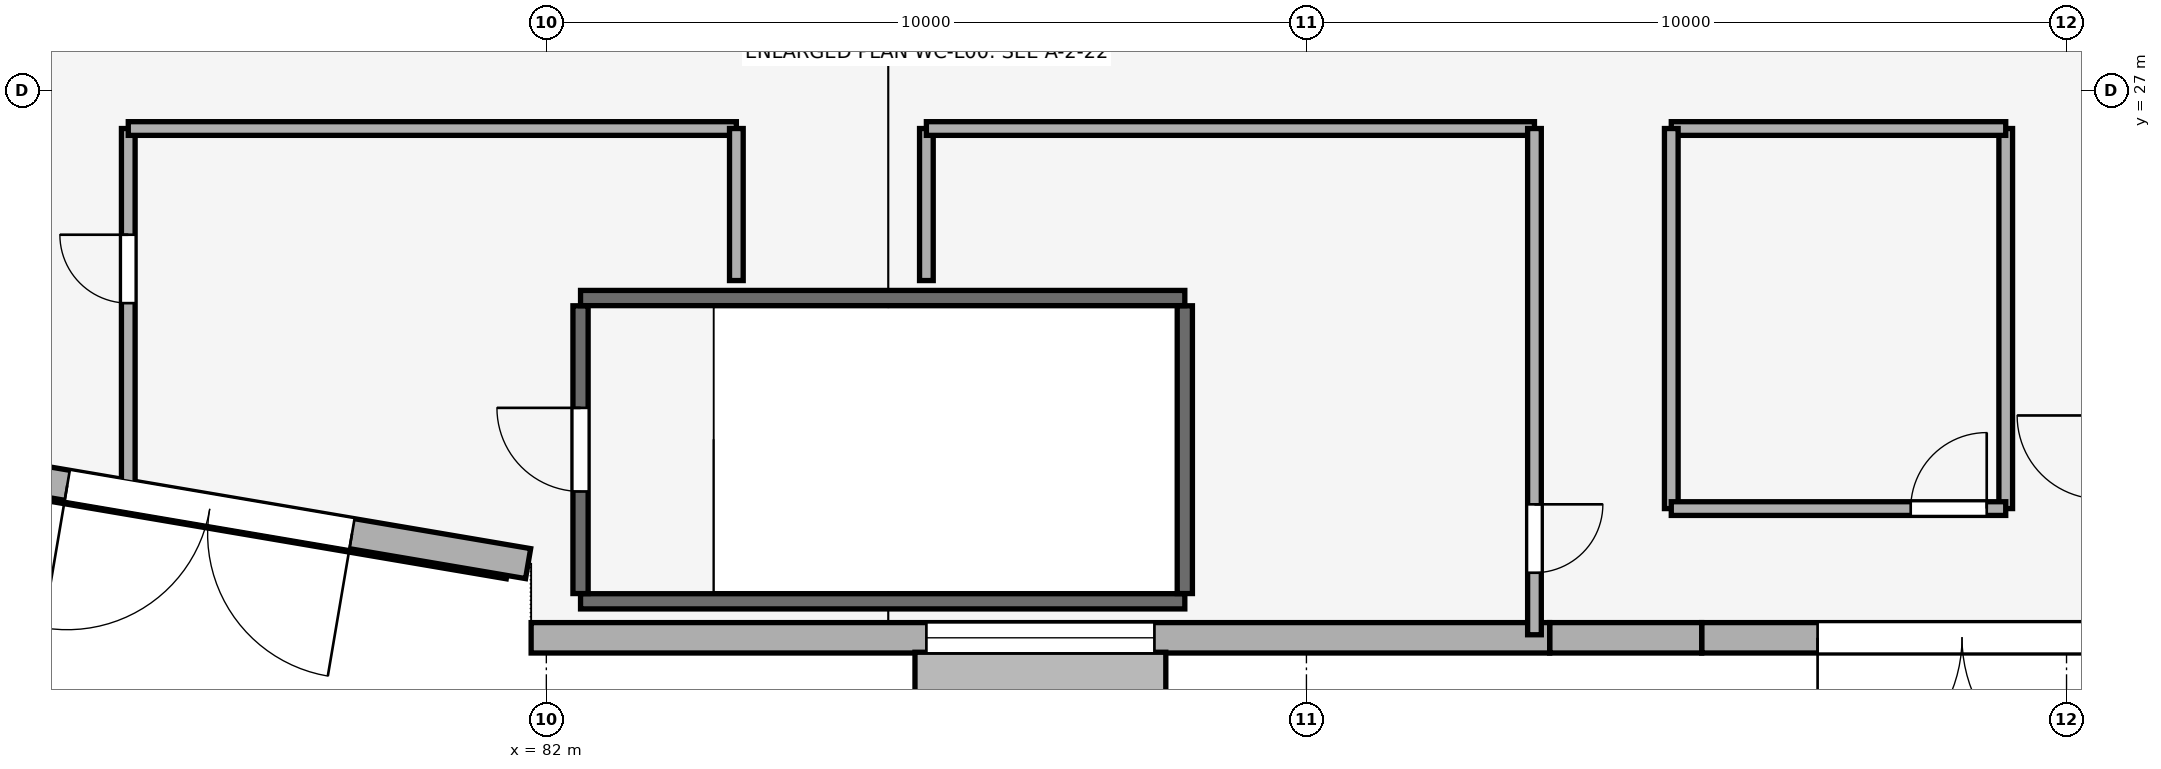
"""IFC4 building model, lengths in metres.
Left out: names, types, materials, properties, quantities, classifications, styles, units other than length and angle.
Written with IfcOpenShell. Run it as: python <this file> out.ifc"""

import sys

from ifc_helpers import new_model, si_unit, direction, frame, frame_2d, origin, place, context, subcontext, project, spatial, rectangle, extrude, element, fill, save


model = new_model("IFC4")
c1 = context("Model", 3, precision=1e-05, world=origin(), true_north=direction((0.0, 1.0)))
c2 = subcontext(c1, "Body", "Model", "MODEL_VIEW")
j1 = project(units=[si_unit("LENGTHUNIT", "METRE"), si_unit("PLANEANGLEUNIT", "RADIAN")], contexts=[c1])
p1 = place(None, origin())
s1 = spatial("IfcSite", under=j1, at=p1, CompositionType="ELEMENT")
p2 = place(p1, origin())
s2 = spatial("IfcBuilding", under=s1, at=p2, CompositionType="ELEMENT")
p3 = place(p2, origin())
s3 = spatial("IfcBuildingStorey", under=s2, at=p3, CompositionType="ELEMENT", Elevation=0.0)
p4 = place(p3, frame((104.05, 19.8, 0.0), z_axis=(0.0, 0.0, 1.0), x_axis=(-1.0, 0.0, 0.0)))
e1 = element("IfcWall", 1, at=p4, inside=s3, PredefinedType="STANDARD", context=c2, shape_type="SweptSolid", body=[
    extrude(rectangle(XDim=6.85, YDim=0.4, at=frame_2d((3.425, 0.0))), origin(), (0.0, 0.0, 1.0), 5.12),
])
p5 = place(p4, frame((1.525, 0.0, 0.0)))
e2 = element("IfcOpeningElement", 2, at=p5, cuts=e1, PredefinedType="OPENING", context=c2, shape_type="SweptSolid", body=[
    extrude(rectangle(XDim=3.8, YDim=2.8, at=frame_2d((1.9, 1.4))), frame((0.0, 0.21, 0.0), z_axis=(0.0, -1.0, 0.0), x_axis=(1.0, 0.0, 0.0)), (0.0, 0.0, 1.0), 0.42),
])
p6 = place(p3, frame((97.2, 19.8, 0.0), z_axis=(0.0, 0.0, 1.0), x_axis=(-1.0, 0.0, 0.0)))
e3 = element("IfcWall", 3, at=p6, inside=s3, PredefinedType="STANDARD", context=c2, shape_type="SweptSolid", body=[
    extrude(rectangle(XDim=2.0, YDim=0.4, at=frame_2d((1.0, 0.0))), origin(), (0.0, 0.0, 1.0), 5.12),
])
p7 = place(p3, frame((95.2, 19.8, 0.0), z_axis=(0.0, 0.0, 1.0), x_axis=(-1.0, 0.0, 0.0)))
e4 = element("IfcWall", 4, at=p7, inside=s3, PredefinedType="STANDARD", context=c2, shape_type="SweptSolid", body=[
    extrude(rectangle(XDim=13.4, YDim=0.4, at=frame_2d((6.7, 0.0))), origin(), (0.0, 0.0, 1.0), 5.12),
])
p8 = place(p7, frame((5.2, 0.0, 0.85)))
e5 = element("IfcOpeningElement", 5, at=p8, cuts=e4, PredefinedType="OPENING", context=c2, shape_type="SweptSolid", body=[
    extrude(rectangle(XDim=3.0, YDim=2.4, at=frame_2d((1.5, 1.2))), frame((0.0, 0.21, 0.0), z_axis=(0.0, -1.0, 0.0), x_axis=(1.0, 0.0, 0.0)), (0.0, 0.0, 1.0), 0.42),
])
p9 = place(p3, frame((81.76, 20.776, 0.0), z_axis=(0.0, 0.0, 1.0), x_axis=(-0.985868134206, 0.167523198264, 0.0)))
e6 = element("IfcWall", 6, at=p9, inside=s3, PredefinedType="STANDARD", context=c2, shape_type="SweptSolid", body=[
    extrude(rectangle(XDim=8.501, YDim=0.4, at=frame_2d((4.25, 0.0))), origin(), (0.0, 0.0, 1.0), 5.12),
])
p10 = place(p9, frame((2.35, 0.0, 0.0)))
e7 = element("IfcOpeningElement", 7, at=p10, cuts=e6, PredefinedType="OPENING", context=c2, shape_type="SweptSolid", body=[
    extrude(rectangle(XDim=3.8, YDim=2.8, at=frame_2d((1.9, 1.4))), frame((0.0, 0.21, 0.0), z_axis=(0.0, -1.0, 0.0), x_axis=(1.0, 0.0, 0.0)), (0.0, 0.0, 1.0), 0.42),
])
p11 = place(p3, frame((82.45, 20.28, 0.0), z_axis=(0.0, 0.0, 1.0), x_axis=(1.0, 0.0, 0.0)))
e8 = element("IfcWall", 8, at=p11, inside=s3, PredefinedType="SHEAR", context=c2, shape_type="SweptSolid", body=[
    extrude(rectangle(XDim=7.95, YDim=0.2, at=frame_2d((3.975, 0.0))), origin(), (0.0, 0.0, 1.0), 5.4),
])
p12 = place(p3, frame((82.45, 20.382, 0.0), z_axis=(0.0, 0.0, 1.0), x_axis=(0.0, 1.0, 0.0)))
e9 = element("IfcWall", 9, at=p12, inside=s3, PredefinedType="SHEAR", context=c2, shape_type="SweptSolid", body=[
    extrude(rectangle(XDim=3.786, YDim=0.2, at=frame_2d((1.893, 0.0))), origin(), (0.0, 0.0, 1.0), 5.4),
])
p13 = place(p12, frame((1.343, 0.0, 0.0)))
e10 = element("IfcOpeningElement", 10, at=p13, cuts=e9, PredefinedType="OPENING", context=c2, shape_type="SweptSolid", body=[
    extrude(rectangle(XDim=1.1, YDim=2.15, at=frame_2d((0.55, 1.075))), frame((0.0, 0.11, 0.0), z_axis=(0.0, -1.0, 0.0), x_axis=(1.0, 0.0, 0.0)), (0.0, 0.0, 1.0), 0.22),
])
p14 = place(p3, frame((90.4, 20.382, 0.0), z_axis=(0.0, 0.0, 1.0), x_axis=(0.0, 1.0, 0.0)))
e11 = element("IfcWall", 11, at=p14, inside=s3, PredefinedType="SHEAR", context=c2, shape_type="SweptSolid", body=[
    extrude(rectangle(XDim=3.786, YDim=0.2, at=frame_2d((1.893, 0.0))), origin(), (0.0, 0.0, 1.0), 5.4),
])
p15 = place(p3, frame((82.45, 24.27, 0.0), z_axis=(0.0, 0.0, 1.0), x_axis=(1.0, 0.0, 0.0)))
e12 = element("IfcWall", 12, at=p15, inside=s3, PredefinedType="SHEAR", context=c2, shape_type="SweptSolid", body=[
    extrude(rectangle(XDim=7.95, YDim=0.2, at=frame_2d((3.975, 0.0))), origin(), (0.0, 0.0, 1.0), 5.4),
])
p16 = place(p3, frame((76.5, 21.71, 0.0), z_axis=(0.0, 0.0, 1.0), x_axis=(0.0, 1.0, 0.0)))
e13 = element("IfcWall", 13, at=p16, inside=s3, PredefinedType="PARTITIONING", context=c2, shape_type="SweptSolid", body=[
    extrude(rectangle(XDim=4.79, YDim=0.18, at=frame_2d((2.395, 0.0))), origin(), (0.0, 0.0, 1.0), 5.12),
])
p17 = place(p16, frame((2.493, 0.0, 0.0)))
e14 = element("IfcOpeningElement", 14, at=p17, cuts=e13, PredefinedType="OPENING", context=c2, shape_type="SweptSolid", body=[
    extrude(rectangle(XDim=0.9, YDim=2.1, at=frame_2d((0.45, 1.05))), frame((0.0, 0.1, 0.0), z_axis=(0.0, -1.0, 0.0), x_axis=(1.0, 0.0, 0.0)), (0.0, 0.0, 1.0), 0.2),
])
p18 = place(p3, frame((76.5, 26.5, 0.0), z_axis=(0.0, 0.0, 1.0), x_axis=(1.0, 0.0, 0.0)))
e15 = element("IfcWall", 15, at=p18, inside=s3, PredefinedType="PARTITIONING", context=c2, shape_type="SweptSolid", body=[
    extrude(rectangle(XDim=8.0, YDim=0.18, at=frame_2d((4.0, 0.0))), origin(), (0.0, 0.0, 1.0), 5.12),
])
for number, where, z_axis, x_axis in (
    (16, (84.5, 26.5, 0.0), (0.0, 0.0, 1.0), (0.0, -1.0, 0.0)),
    (17, (87.0, 24.5, 0.0), (0.0, 0.0, 1.0), (0.0, 1.0, 0.0)),
):
    element("IfcWall", number, at=place(p3, frame(where, z_axis=z_axis, x_axis=x_axis)), inside=s3, PredefinedType="PARTITIONING", context=c2, shape_type="SweptSolid", body=[
        extrude(rectangle(XDim=2.0, YDim=0.18, at=frame_2d((1.0, 0.0))), origin(), (0.0, 0.0, 1.0), 5.12),
    ])
p19 = place(p3, frame((87.0, 26.5, 0.0), z_axis=(0.0, 0.0, 1.0), x_axis=(1.0, 0.0, 0.0)))
e18 = element("IfcWall", 18, at=p19, inside=s3, PredefinedType="PARTITIONING", context=c2, shape_type="SweptSolid", body=[
    extrude(rectangle(XDim=8.0, YDim=0.18, at=frame_2d((4.0, 0.0))), origin(), (0.0, 0.0, 1.0), 5.12),
])
p20 = place(p3, frame((95.0, 26.5, 0.0), z_axis=(0.0, 0.0, 1.0), x_axis=(0.0, -1.0, 0.0)))
e19 = element("IfcWall", 19, at=p20, inside=s3, PredefinedType="PARTITIONING", context=c2, shape_type="SweptSolid", body=[
    extrude(rectangle(XDim=6.66, YDim=0.18, at=frame_2d((3.33, 0.0))), origin(), (0.0, 0.0, 1.0), 5.12),
])
p21 = place(p20, frame((4.944, 0.0, 0.0)))
e20 = element("IfcOpeningElement", 20, at=p21, cuts=e19, PredefinedType="OPENING", context=c2, shape_type="SweptSolid", body=[
    extrude(rectangle(XDim=0.9, YDim=2.1, at=frame_2d((0.45, 1.05))), frame((0.0, 0.1, 0.0), z_axis=(0.0, -1.0, 0.0), x_axis=(1.0, 0.0, 0.0)), (0.0, 0.0, 1.0), 0.2),
])
p22 = place(p3, frame((101.2, 21.5, 0.0), z_axis=(0.0, 0.0, 1.0), x_axis=(0.0, 1.0, 0.0)))
e21 = element("IfcWall", 21, at=p22, inside=s3, PredefinedType="PARTITIONING", context=c2, shape_type="SweptSolid", body=[
    extrude(rectangle(XDim=5.0, YDim=0.18, at=frame_2d((2.5, 0.0))), origin(), (0.0, 0.0, 1.0), 5.12),
])
p23 = place(p3, frame((101.2, 26.5, 0.0), z_axis=(0.0, 0.0, 1.0), x_axis=(-1.0, 0.0, 0.0)))
e22 = element("IfcWall", 22, at=p23, inside=s3, PredefinedType="PARTITIONING", context=c2, shape_type="SweptSolid", body=[
    extrude(rectangle(XDim=4.4, YDim=0.18, at=frame_2d((2.2, 0.0))), origin(), (0.0, 0.0, 1.0), 5.12),
])
p24 = place(p3, frame((96.8, 26.5, 0.0), z_axis=(0.0, 0.0, 1.0), x_axis=(0.0, -1.0, 0.0)))
e23 = element("IfcWall", 23, at=p24, inside=s3, PredefinedType="PARTITIONING", context=c2, shape_type="SweptSolid", body=[
    extrude(rectangle(XDim=5.0, YDim=0.18, at=frame_2d((2.5, 0.0))), origin(), (0.0, 0.0, 1.0), 5.12),
])
p25 = place(p3, frame((96.8, 21.5, 0.0), z_axis=(0.0, 0.0, 1.0), x_axis=(1.0, 0.0, 0.0)))
e24 = element("IfcWall", 24, at=p25, inside=s3, PredefinedType="PARTITIONING", context=c2, shape_type="SweptSolid", body=[
    extrude(rectangle(XDim=4.4, YDim=0.18, at=frame_2d((2.2, 0.0))), origin(), (0.0, 0.0, 1.0), 5.12),
])
p26 = place(p25, frame((3.15, 0.0, 0.0)))
e25 = element("IfcOpeningElement", 25, at=p26, cuts=e24, PredefinedType="OPENING", context=c2, shape_type="SweptSolid", body=[
    extrude(rectangle(XDim=1.0, YDim=2.15, at=frame_2d((0.5, 1.075))), frame((0.0, 0.1, 0.0), z_axis=(0.0, -1.0, 0.0), x_axis=(1.0, 0.0, 0.0)), (0.0, 0.0, 1.0), 0.2),
])
p27 = place(p5, origin())
e26 = element("IfcDoor", 26, at=p27, inside=s3, OperationType="DOUBLE_DOOR_SINGLE_SWING", PredefinedType="DOOR", context=c2, shape_type="SweptSolid", body=[
    extrude(rectangle(XDim=3.8, YDim=2.8, at=frame_2d((1.9, 1.4))), frame((0.0, 0.025, 0.0), z_axis=(0.0, -1.0, 0.0), x_axis=(1.0, 0.0, 0.0)), (0.0, 0.0, 1.0), 0.05),
])
fill(e2, e26)
p28 = place(p8, origin())
e27 = element("IfcWindow", 27, at=p28, inside=s3, PartitioningType="SINGLE_PANEL", PredefinedType="WINDOW", context=c2, shape_type="SweptSolid", body=[
    extrude(rectangle(XDim=3.0, YDim=2.4, at=frame_2d((1.5, 1.2))), frame((0.0, 0.03, 0.0), z_axis=(0.0, -1.0, 0.0), x_axis=(1.0, 0.0, 0.0)), (0.0, 0.0, 1.0), 0.06),
])
fill(e5, e27)
p29 = place(p10, origin())
e28 = element("IfcDoor", 28, at=p29, inside=s3, OperationType="DOUBLE_DOOR_SINGLE_SWING", PredefinedType="DOOR", context=c2, shape_type="SweptSolid", body=[
    extrude(rectangle(XDim=3.8, YDim=2.8, at=frame_2d((1.9, 1.4))), frame((0.0, 0.025, 0.0), z_axis=(0.0, -1.0, 0.0), x_axis=(1.0, 0.0, 0.0)), (0.0, 0.0, 1.0), 0.05),
])
fill(e7, e28)
p30 = place(p13, frame((1.1, 0.0, 0.0), z_axis=(0.0, 0.0, 1.0), x_axis=(-1.0, 0.0, 0.0)))
e29 = element("IfcDoor", 29, at=p30, inside=s3, OperationType="SINGLE_SWING_LEFT", PredefinedType="DOOR", context=c2, shape_type="SweptSolid", body=[
    extrude(rectangle(XDim=1.1, YDim=2.15, at=frame_2d((0.55, 1.075))), frame((0.0, 0.025, 0.0), z_axis=(0.0, -1.0, 0.0), x_axis=(1.0, 0.0, 0.0)), (0.0, 0.0, 1.0), 0.05),
])
fill(e10, e29)
p31 = place(p17, origin())
e30 = element("IfcDoor", 30, at=p31, inside=s3, OperationType="SINGLE_SWING_RIGHT", PredefinedType="DOOR", context=c2, shape_type="SweptSolid", body=[
    extrude(rectangle(XDim=0.9, YDim=2.1, at=frame_2d((0.45, 1.05))), frame((0.0, 0.025, 0.0), z_axis=(0.0, -1.0, 0.0), x_axis=(1.0, 0.0, 0.0)), (0.0, 0.0, 1.0), 0.05),
])
fill(e14, e30)
p32 = place(p21, origin())
e31 = element("IfcDoor", 31, at=p32, inside=s3, OperationType="SINGLE_SWING_LEFT", PredefinedType="DOOR", context=c2, shape_type="SweptSolid", body=[
    extrude(rectangle(XDim=0.9, YDim=2.1, at=frame_2d((0.45, 1.05))), frame((0.0, 0.025, 0.0), z_axis=(0.0, -1.0, 0.0), x_axis=(1.0, 0.0, 0.0)), (0.0, 0.0, 1.0), 0.05),
])
fill(e20, e31)
p33 = place(p26, origin())
e32 = element("IfcDoor", 32, at=p33, inside=s3, OperationType="SINGLE_SWING_RIGHT", PredefinedType="DOOR", context=c2, shape_type="SweptSolid", body=[
    extrude(rectangle(XDim=1.0, YDim=2.15, at=frame_2d((0.5, 1.075))), frame((0.0, 0.025, 0.0), z_axis=(0.0, -1.0, 0.0), x_axis=(1.0, 0.0, 0.0)), (0.0, 0.0, 1.0), 0.05),
])
fill(e25, e32)
save(model, sys.argv[1])
